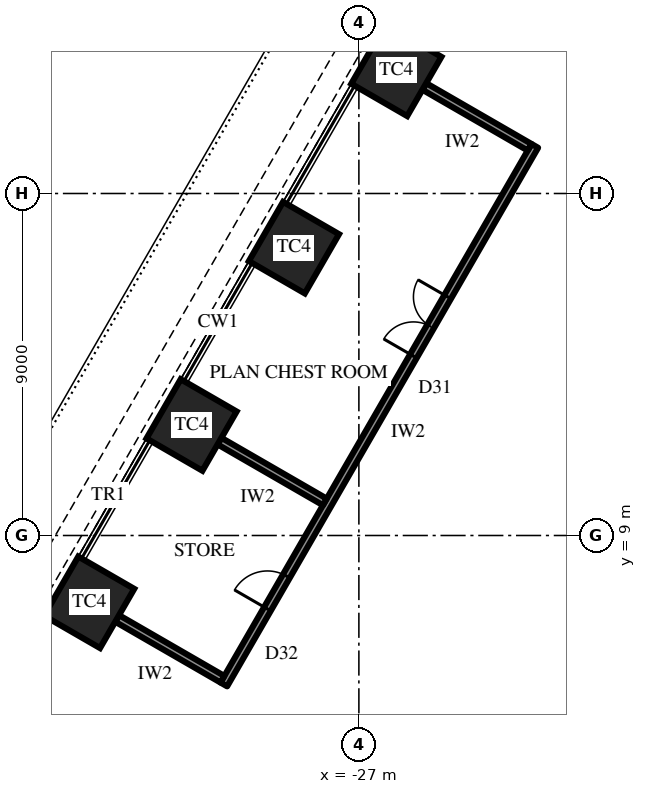
"""IFC4 building model, lengths in metres.
Left out: names, types, materials, properties, quantities, classifications, styles, units other than length and angle.
Written with IfcOpenShell. Run it as: python <this file> out.ifc"""

import sys

from ifc_helpers import new_model, si_unit, direction, frame, frame_2d, origin, origin_2d, place, context, subcontext, project, spatial, rectangle, extrude, element, fill, save


model = new_model("IFC4")
c1 = context("Model", 3, precision=1e-05, world=origin(), true_north=direction((0.0, 1.0)))
c2 = subcontext(c1, "Body", "Model", "MODEL_VIEW")
j1 = project(units=[si_unit("LENGTHUNIT", "METRE"), si_unit("PLANEANGLEUNIT", "RADIAN")], contexts=[c1])
p1 = place(None, origin())
s1 = spatial("IfcSite", under=j1, at=p1, CompositionType="ELEMENT")
p2 = place(p1, origin())
s2 = spatial("IfcBuilding", under=s1, at=p2, CompositionType="ELEMENT")
p3 = place(p2, frame((0.0, 0.0, 94.9)))
s3 = spatial("IfcBuildingStorey", under=s2, at=p3, CompositionType="ELEMENT", Elevation=94.9)
for number, where, z_axis, x_axis in (
    (1, (-26.014, 21.242, 0.0), (0.0, 0.0, 1.0), (-0.5, -0.866, 0.0)),
    (2, (-28.709, 16.575, 0.0), (0.0, 0.0, 1.0), (-0.5, -0.866, 0.0)),
    (3, (-31.403, 11.908, 0.0), (0.0, 0.0, 1.0), (-0.5, -0.866, 0.0)),
    (4, (-34.097, 7.242, 0.0), (0.0, 0.0, 1.0), (-0.5, -0.866, 0.0)),
):
    element("IfcColumn", number, at=place(p3, frame(where, z_axis=z_axis, x_axis=x_axis)), inside=s3, PredefinedType="COLUMN", context=c2, shape_type="SweptSolid", body=[
        extrude(rectangle(XDim=1.8, YDim=1.7, at=origin_2d()), origin(), (0.0, 0.0, 1.0), 4.2),
    ])
p4 = place(p3, frame((-22.37, 19.253, 0.0), z_axis=(0.0, 0.0, 1.0), x_axis=(-0.500000949028, -0.866024855862, 0.0)))
e5 = element("IfcWall", 5, at=p4, inside=s3, PredefinedType="PARTITIONING", context=c2, shape_type="SweptSolid", body=[
    extrude(rectangle(XDim=16.366, YDim=0.2, at=frame_2d((8.183, 0.0))), origin(), (0.0, 0.0, 1.0), 4.0),
])
p5 = place(p4, frame((4.589, 0.0, 0.0)))
e6 = element("IfcOpeningElement", 6, at=p5, cuts=e5, PredefinedType="OPENING", context=c2, shape_type="SweptSolid", body=[
    extrude(rectangle(XDim=1.8, YDim=2.4, at=frame_2d((0.9, 1.2))), frame((0.0, 0.11, 0.0), z_axis=(0.0, -1.0, 0.0), x_axis=(1.0, 0.0, 0.0)), (0.0, 0.0, 1.0), 0.22),
])
p6 = place(p4, frame((13.072, 0.0, 0.0)))
e7 = element("IfcOpeningElement", 7, at=p6, cuts=e5, PredefinedType="OPENING", context=c2, shape_type="SweptSolid", body=[
    extrude(rectangle(XDim=1.0, YDim=2.2, at=frame_2d((0.5, 1.1))), frame((0.0, 0.11, 0.0), z_axis=(0.0, -1.0, 0.0), x_axis=(1.0, 0.0, 0.0)), (0.0, 0.0, 1.0), 0.22),
])
p7 = place(p3, frame((-22.507, 19.217, 0.0), z_axis=(0.0, 0.0, 1.0), x_axis=(-0.866008981251, 0.500028443584, 0.0)))
e8 = element("IfcWall", 8, at=p7, inside=s3, PredefinedType="PARTITIONING", context=c2, shape_type="SweptSolid", body=[
    extrude(rectangle(XDim=3.2, YDim=0.2, at=frame_2d((1.6, 0.0))), origin(), (0.0, 0.0, 1.0), 2.992),
])
p8 = place(p3, frame((-27.896, 9.883, 0.0), z_axis=(0.0, 0.0, 1.0), x_axis=(-0.866008981251, 0.500028443584, 0.0)))
e9 = element("IfcWall", 9, at=p8, inside=s3, PredefinedType="PARTITIONING", context=c2, shape_type="SweptSolid", body=[
    extrude(rectangle(XDim=3.2, YDim=0.2, at=frame_2d((1.6, 0.0))), origin(), (0.0, 0.0, 1.0), 2.944),
])
p9 = place(p3, frame((-30.59, 5.217, 0.0), z_axis=(0.0, 0.0, 1.0), x_axis=(-0.866028054938, 0.499995408039, 0.0)))
e10 = element("IfcWall", 10, at=p9, inside=s3, PredefinedType="PARTITIONING", context=c2, shape_type="SweptSolid", body=[
    extrude(rectangle(XDim=3.2, YDim=0.2, at=frame_2d((1.6, 0.0))), origin(), (0.0, 0.0, 1.0), 2.944),
])
p10 = place(p5, frame((1.8, 0.0, 0.0), z_axis=(0.0, 0.0, 1.0), x_axis=(-1.0, 0.0, 0.0)))
e11 = element("IfcDoor", 11, at=p10, inside=s3, OperationType="DOUBLE_DOOR_SINGLE_SWING", PredefinedType="DOOR", context=c2, shape_type="SweptSolid", body=[
    extrude(rectangle(XDim=1.8, YDim=2.4, at=frame_2d((0.9, 1.2))), frame((0.0, 0.025, 0.0), z_axis=(0.0, -1.0, 0.0), x_axis=(1.0, 0.0, 0.0)), (0.0, 0.0, 1.0), 0.05),
])
fill(e6, e11)
p11 = place(p6, frame((1.0, 0.0, 0.0), z_axis=(0.0, 0.0, 1.0), x_axis=(-1.0, 0.0, 0.0)))
e12 = element("IfcDoor", 12, at=p11, inside=s3, OperationType="SINGLE_SWING_RIGHT", PredefinedType="DOOR", context=c2, shape_type="SweptSolid", body=[
    extrude(rectangle(XDim=1.0, YDim=2.2, at=frame_2d((0.5, 1.1))), frame((0.0, 0.025, 0.0), z_axis=(0.0, -1.0, 0.0), x_axis=(1.0, 0.0, 0.0)), (0.0, 0.0, 1.0), 0.05),
])
fill(e7, e12)
save(model, sys.argv[1])
